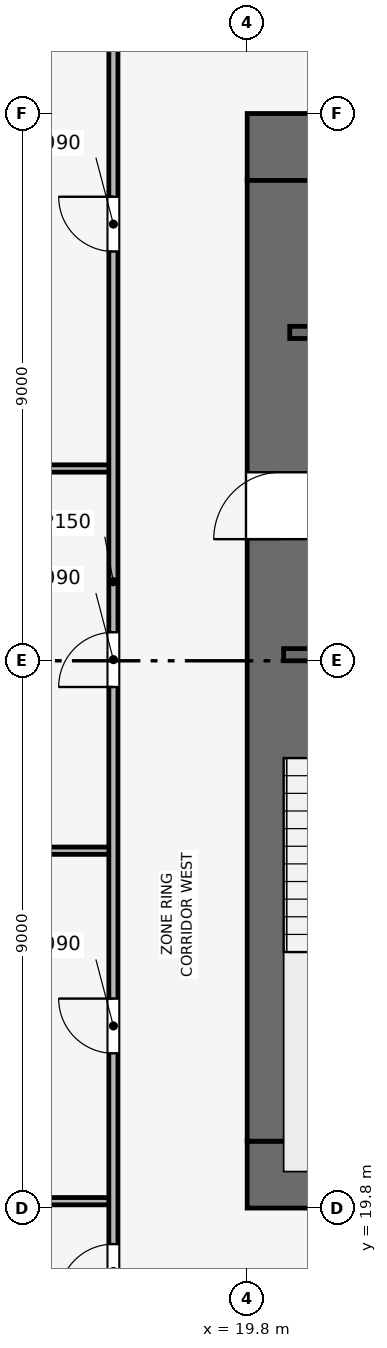
"""IFC4 building model, lengths in metres.
Left out: names, types, materials, properties, quantities, classifications, styles, units other than length and angle.
Written with IfcOpenShell. Run it as: python <this file> out.ifc"""

import sys

from ifc_helpers import new_model, si_unit, direction, frame, frame_2d, origin, place, context, subcontext, project, spatial, rectangle, extrude, element, fill, save


model = new_model("IFC4")
c1 = context("Model", 3, precision=1e-05, world=origin(), true_north=direction((0.0, 1.0)))
c2 = subcontext(c1, "Body", "Model", "MODEL_VIEW")
j1 = project(units=[si_unit("LENGTHUNIT", "METRE"), si_unit("PLANEANGLEUNIT", "RADIAN")], contexts=[c1])
p1 = place(None, origin())
s1 = spatial("IfcSite", under=j1, at=p1, CompositionType="ELEMENT")
p2 = place(p1, origin())
s2 = spatial("IfcBuilding", under=s1, at=p2, CompositionType="ELEMENT")
p3 = place(p2, frame((0.0, 0.0, 80.7)))
s3 = spatial("IfcBuildingStorey", under=s2, at=p3, CompositionType="ELEMENT", Elevation=80.7)
p4 = place(p3, frame((19.8, 20.35, 0.0), z_axis=(0.0, 0.0, 1.0), x_axis=(1.0, 0.0, 0.0)))
e1 = element("IfcWall", 1, at=p4, inside=s3, PredefinedType="SHEAR", context=c2, shape_type="SweptSolid", body=[
    extrude(rectangle(XDim=18.0, YDim=1.1, at=frame_2d((9.0, 0.0))), origin(), (0.0, 0.0, 1.0), 3.9),
])
p5 = place(p4, frame((8.4, 0.0, 0.0)))
e2 = element("IfcOpeningElement", 2, at=p5, cuts=e1, PredefinedType="OPENING", context=c2, shape_type="SweptSolid", body=[
    extrude(rectangle(XDim=1.2, YDim=2.2, at=frame_2d((0.6, 1.1))), frame((0.0, 0.56, 0.0), z_axis=(0.0, -1.0, 0.0), x_axis=(1.0, 0.0, 0.0)), (0.0, 0.0, 1.0), 1.12),
])
p6 = place(p3, frame((19.8, 37.25, 0.0), z_axis=(0.0, 0.0, 1.0), x_axis=(1.0, 0.0, 0.0)))
e3 = element("IfcWall", 3, at=p6, inside=s3, PredefinedType="SHEAR", context=c2, shape_type="SweptSolid", body=[
    extrude(rectangle(XDim=18.0, YDim=1.1, at=frame_2d((9.0, 0.0))), origin(), (0.0, 0.0, 1.0), 3.9),
])
p7 = place(p6, frame((7.05, 0.0, 0.0)))
e4 = element("IfcOpeningElement", 4, at=p7, cuts=e3, PredefinedType="OPENING", context=c2, shape_type="SweptSolid", body=[
    extrude(rectangle(XDim=1.1, YDim=2.15, at=frame_2d((0.55, 1.075))), frame((0.0, 0.56, 0.0), z_axis=(0.0, -1.0, 0.0), x_axis=(1.0, 0.0, 0.0)), (0.0, 0.0, 1.0), 1.12),
])
p8 = place(p3, frame((20.35, 20.9, 0.0), z_axis=(0.0, 0.0, 1.0), x_axis=(0.0, 1.0, 0.0)))
e5 = element("IfcWall", 5, at=p8, inside=s3, PredefinedType="SHEAR", context=c2, shape_type="SweptSolid", body=[
    extrude(rectangle(XDim=15.8, YDim=1.1, at=frame_2d((7.9, 0.0))), origin(), (0.0, 0.0, 1.0), 3.9),
])
p9 = place(p8, frame((9.9, 0.0, 0.0)))
e6 = element("IfcOpeningElement", 6, at=p9, cuts=e5, PredefinedType="OPENING", context=c2, shape_type="SweptSolid", body=[
    extrude(rectangle(XDim=1.1, YDim=2.15, at=frame_2d((0.55, 1.075))), frame((0.0, 0.56, 0.0), z_axis=(0.0, -1.0, 0.0), x_axis=(1.0, 0.0, 0.0)), (0.0, 0.0, 1.0), 1.12),
])
p10 = place(p3, frame((20.4, 28.9, 0.0), z_axis=(0.0, 0.0, 1.0), x_axis=(1.0, 0.0, 0.0)))
e7 = element("IfcWall", 7, at=p10, inside=s3, PredefinedType="SHEAR", context=c2, shape_type="SweptSolid", body=[
    extrude(rectangle(XDim=3.15, YDim=0.2, at=frame_2d((1.575, 0.0))), origin(), (0.0, 0.0, 1.0), 3.65),
])
p11 = place(p10, frame((0.8, 0.0, 0.0)))
e8 = element("IfcOpeningElement", 8, at=p11, cuts=e7, PredefinedType="OPENING", context=c2, shape_type="SweptSolid", body=[
    extrude(rectangle(XDim=1.0, YDim=2.1, at=frame_2d((0.5, 1.05))), frame((0.0, 0.11, 0.0), z_axis=(0.0, -1.0, 0.0), x_axis=(1.0, 0.0, 0.0)), (0.0, 0.0, 1.0), 0.22),
])
p12 = place(p3, frame((20.5, 34.2, 0.0), z_axis=(0.0, 0.0, 1.0), x_axis=(1.0, 0.0, 0.0)))
e9 = element("IfcWall", 9, at=p12, inside=s3, PredefinedType="SHEAR", context=c2, shape_type="SweptSolid", body=[
    extrude(rectangle(XDim=3.05, YDim=0.2, at=frame_2d((1.525, 0.0))), origin(), (0.0, 0.0, 1.0), 3.65),
])
p13 = place(p12, frame((0.75, 0.0, 0.0)))
e10 = element("IfcOpeningElement", 10, at=p13, cuts=e9, PredefinedType="OPENING", context=c2, shape_type="SweptSolid", body=[
    extrude(rectangle(XDim=1.1, YDim=2.15, at=frame_2d((0.55, 1.075))), frame((0.0, 0.11, 0.0), z_axis=(0.0, -1.0, 0.0), x_axis=(1.0, 0.0, 0.0)), (0.0, 0.0, 1.0), 0.22),
])
for number, where, z_axis, x_axis in (
    (11, (1.03, 19.913, 0.0), (0.0, 0.0, 1.0), (1.0, 0.0, 0.0)),
    (12, (1.03, 25.677, 0.0), (0.0, 0.0, 1.0), (1.0, 0.0, 0.0)),
    (13, (1.03, 31.962, 0.0), (0.0, 0.0, 1.0), (1.0, 0.0, 0.0)),
):
    element("IfcWall", number, at=place(p3, frame(where, z_axis=z_axis, x_axis=x_axis)), inside=s3, PredefinedType="PARTITIONING", context=c2, shape_type="SweptSolid", body=[
        extrude(rectangle(XDim=16.57, YDim=0.12, at=frame_2d((8.285, 0.0))), origin(), (0.0, 0.0, 1.0), 2.935),
    ])
p14 = place(p3, frame((17.6, 17.6, 0.0), z_axis=(0.0, 0.0, 1.0), x_axis=(0.0, 1.0, 0.0)))
e14 = element("IfcWall", 14, at=p14, inside=s3, PredefinedType="PARTITIONING", context=c2, shape_type="SweptSolid", body=[
    extrude(rectangle(XDim=22.4, YDim=0.15, at=frame_2d((11.2, 0.0))), origin(), (0.0, 0.0, 1.0), 3.085),
])
p15 = place(p14, frame((0.707, 0.0, 0.0)))
e15 = element("IfcOpeningElement", 15, at=p15, cuts=e14, PredefinedType="OPENING", context=c2, shape_type="SweptSolid", body=[
    extrude(rectangle(XDim=0.9, YDim=2.1, at=frame_2d((0.45, 1.05))), frame((0.0, 0.085, 0.0), z_axis=(0.0, -1.0, 0.0), x_axis=(1.0, 0.0, 0.0)), (0.0, 0.0, 1.0), 0.17),
])
p16 = place(p14, frame((4.745, 0.0, 0.0)))
e16 = element("IfcOpeningElement", 16, at=p16, cuts=e14, PredefinedType="OPENING", context=c2, shape_type="SweptSolid", body=[
    extrude(rectangle(XDim=0.9, YDim=2.1, at=frame_2d((0.45, 1.05))), frame((0.0, 0.085, 0.0), z_axis=(0.0, -1.0, 0.0), x_axis=(1.0, 0.0, 0.0)), (0.0, 0.0, 1.0), 0.17),
])
p17 = place(p14, frame((10.769, 0.0, 0.0)))
e17 = element("IfcOpeningElement", 17, at=p17, cuts=e14, PredefinedType="OPENING", context=c2, shape_type="SweptSolid", body=[
    extrude(rectangle(XDim=0.9, YDim=2.1, at=frame_2d((0.45, 1.05))), frame((0.0, 0.085, 0.0), z_axis=(0.0, -1.0, 0.0), x_axis=(1.0, 0.0, 0.0)), (0.0, 0.0, 1.0), 0.17),
])
p18 = place(p14, frame((17.931, 0.0, 0.0)))
e18 = element("IfcOpeningElement", 18, at=p18, cuts=e14, PredefinedType="OPENING", context=c2, shape_type="SweptSolid", body=[
    extrude(rectangle(XDim=0.9, YDim=2.1, at=frame_2d((0.45, 1.05))), frame((0.0, 0.085, 0.0), z_axis=(0.0, -1.0, 0.0), x_axis=(1.0, 0.0, 0.0)), (0.0, 0.0, 1.0), 0.17),
])
p19 = place(p15, origin())
e19 = element("IfcDoor", 19, at=p19, inside=s3, OperationType="SINGLE_SWING_LEFT", PredefinedType="DOOR", context=c2, shape_type="SweptSolid", body=[
    extrude(rectangle(XDim=0.9, YDim=2.1, at=frame_2d((0.45, 1.05))), frame((0.0, 0.025, 0.0), z_axis=(0.0, -1.0, 0.0), x_axis=(1.0, 0.0, 0.0)), (0.0, 0.0, 1.0), 0.05),
])
fill(e15, e19)
p20 = place(p16, origin())
e20 = element("IfcDoor", 20, at=p20, inside=s3, OperationType="SINGLE_SWING_RIGHT", PredefinedType="DOOR", context=c2, shape_type="SweptSolid", body=[
    extrude(rectangle(XDim=0.9, YDim=2.1, at=frame_2d((0.45, 1.05))), frame((0.0, 0.025, 0.0), z_axis=(0.0, -1.0, 0.0), x_axis=(1.0, 0.0, 0.0)), (0.0, 0.0, 1.0), 0.05),
])
fill(e16, e20)
p21 = place(p17, origin())
e21 = element("IfcDoor", 21, at=p21, inside=s3, OperationType="SINGLE_SWING_LEFT", PredefinedType="DOOR", context=c2, shape_type="SweptSolid", body=[
    extrude(rectangle(XDim=0.9, YDim=2.1, at=frame_2d((0.45, 1.05))), frame((0.0, 0.025, 0.0), z_axis=(0.0, -1.0, 0.0), x_axis=(1.0, 0.0, 0.0)), (0.0, 0.0, 1.0), 0.05),
])
fill(e17, e21)
p22 = place(p18, origin())
e22 = element("IfcDoor", 22, at=p22, inside=s3, OperationType="SINGLE_SWING_RIGHT", PredefinedType="DOOR", context=c2, shape_type="SweptSolid", body=[
    extrude(rectangle(XDim=0.9, YDim=2.1, at=frame_2d((0.45, 1.05))), frame((0.0, 0.025, 0.0), z_axis=(0.0, -1.0, 0.0), x_axis=(1.0, 0.0, 0.0)), (0.0, 0.0, 1.0), 0.05),
])
fill(e18, e22)
p23 = place(p9, origin())
e23 = element("IfcDoor", 23, at=p23, inside=s3, OperationType="SINGLE_SWING_LEFT", PredefinedType="DOOR", context=c2, shape_type="SweptSolid", body=[
    extrude(rectangle(XDim=1.1, YDim=2.15, at=frame_2d((0.55, 1.075))), frame((0.0, 0.025, 0.0), z_axis=(0.0, -1.0, 0.0), x_axis=(1.0, 0.0, 0.0)), (0.0, 0.0, 1.0), 0.05),
])
fill(e6, e23)
save(model, sys.argv[1])
